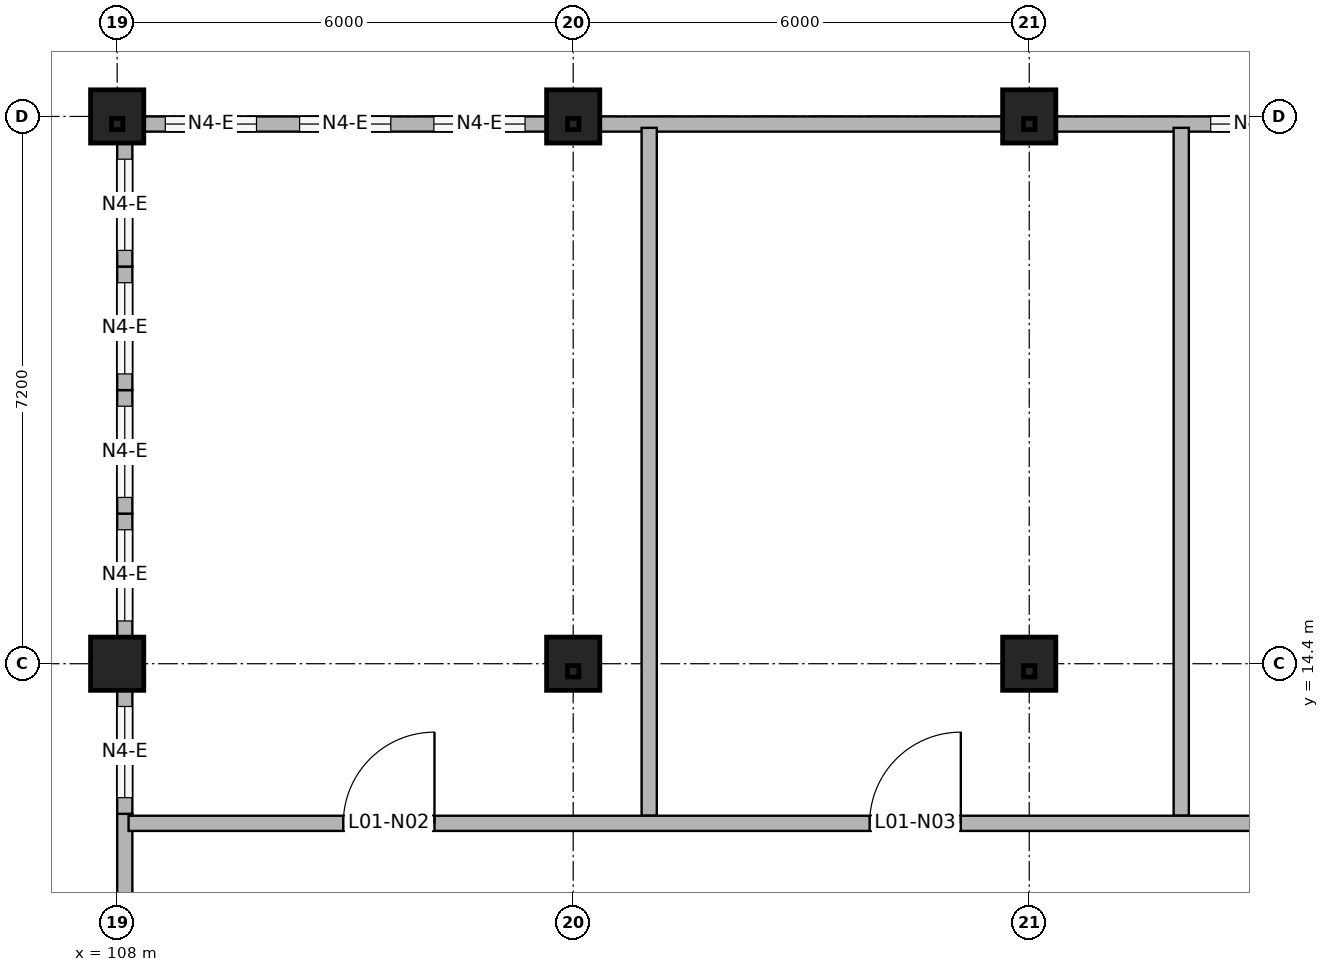
"""IFC4 building model, lengths in metres.
Left out: names, types, materials, properties, quantities, classifications, styles, units other than length and angle.
Written with IfcOpenShell. Run it as: python <this file> out.ifc"""

import sys

from ifc_helpers import new_model, si_unit, direction, frame, frame_2d, origin, origin_2d, place, context, subcontext, project, spatial, rectangle, hollow_rectangle, extrude, element, fill, save


model = new_model("IFC4")
c1 = context("Model", 3, precision=1e-05, world=origin(), true_north=direction((0.0, 1.0)))
c2 = subcontext(c1, "Body", "Model", "MODEL_VIEW")
j1 = project(units=[si_unit("LENGTHUNIT", "METRE"), si_unit("PLANEANGLEUNIT", "RADIAN")], contexts=[c1])
p1 = place(None, origin())
s1 = spatial("IfcSite", under=j1, at=p1, CompositionType="ELEMENT")
p2 = place(p1, origin())
s2 = spatial("IfcBuilding", under=s1, at=p2, CompositionType="ELEMENT")
p3 = place(p2, frame((0.0, 0.0, 4.2)))
s3 = spatial("IfcBuildingStorey", under=s2, at=p3, CompositionType="ELEMENT", Elevation=4.2)
for number, where, z_axis, x_axis in (
    (1, (108.0, 14.4, 0.0), (0.0, 0.0, 1.0), (1.0, 0.0, 0.0)),
    (2, (114.0, 14.4, 0.0), (0.0, 0.0, 1.0), (1.0, 0.0, 0.0)),
    (3, (120.0, 14.4, 0.0), (0.0, 0.0, 1.0), (1.0, 0.0, 0.0)),
    (4, (108.0, 21.6, 0.0), (0.0, 0.0, 1.0), (1.0, 0.0, 0.0)),
    (5, (114.0, 21.6, 0.0), (0.0, 0.0, 1.0), (1.0, 0.0, 0.0)),
    (6, (120.0, 21.6, 0.0), (0.0, 0.0, 1.0), (1.0, 0.0, 0.0)),
):
    element("IfcColumn", number, at=place(p3, frame(where, z_axis=z_axis, x_axis=x_axis)), inside=s3, PredefinedType="COLUMN", context=c2, shape_type="SweptSolid", body=[
        extrude(rectangle(XDim=0.7, YDim=0.7, at=origin_2d()), origin(), (0.0, 0.0, 1.0), 4.004),
    ])
for number, where, z_axis, x_axis in (
    (7, (108.0, 14.3, 4.004), (0.0, 0.0, 1.0), (1.0, 0.0, 0.0)),
    (8, (114.0, 14.3, 4.004), (0.0, 0.0, 1.0), (1.0, 0.0, 0.0)),
    (9, (120.0, 14.3, 4.004), (0.0, 0.0, 1.0), (1.0, 0.0, 0.0)),
    (10, (108.0, 21.5, 4.004), (0.0, 0.0, 1.0), (1.0, 0.0, 0.0)),
    (11, (114.0, 21.5, 4.004), (0.0, 0.0, 1.0), (1.0, 0.0, 0.0)),
    (12, (120.0, 21.5, 4.004), (0.0, 0.0, 1.0), (1.0, 0.0, 0.0)),
):
    element("IfcColumn", number, at=place(p3, frame(where, z_axis=z_axis, x_axis=x_axis)), inside=s3, PredefinedType="COLUMN", context=c2, shape_type="SweptSolid", body=[
        extrude(hollow_rectangle(XDim=0.15, YDim=0.15, WallThickness=0.008, at=origin_2d()), origin(), (0.0, 0.0, 1.0), 1.155),
    ])
p4 = place(p3, frame((108.35, 21.5, 0.0), z_axis=(0.0, 0.0, 1.0), x_axis=(1.0, 0.0, 0.0)))
e13 = element("IfcWall", 13, at=p4, inside=s3, PredefinedType="SOLIDWALL", context=c2, shape_type="SweptSolid", body=[
    extrude(rectangle(XDim=5.3, YDim=0.2, at=frame_2d((2.65, 0.0))), origin(), (0.0, 0.0, 1.0), 3.204),
])
p5 = place(p4, frame((0.283, 0.0, 1.2)))
e14 = element("IfcOpeningElement", 14, at=p5, cuts=e13, PredefinedType="OPENING", context=c2, shape_type="SweptSolid", body=[
    extrude(rectangle(XDim=1.2, YDim=1.4, at=frame_2d((0.6, 0.7))), frame((0.0, 0.11, 0.0), z_axis=(0.0, -1.0, 0.0), x_axis=(1.0, 0.0, 0.0)), (0.0, 0.0, 1.0), 0.22),
])
p6 = place(p4, frame((2.05, 0.0, 1.2)))
e15 = element("IfcOpeningElement", 15, at=p6, cuts=e13, PredefinedType="OPENING", context=c2, shape_type="SweptSolid", body=[
    extrude(rectangle(XDim=1.2, YDim=1.4, at=frame_2d((0.6, 0.7))), frame((0.0, 0.11, 0.0), z_axis=(0.0, -1.0, 0.0), x_axis=(1.0, 0.0, 0.0)), (0.0, 0.0, 1.0), 0.22),
])
p7 = place(p4, frame((3.817, 0.0, 1.2)))
e16 = element("IfcOpeningElement", 16, at=p7, cuts=e13, PredefinedType="OPENING", context=c2, shape_type="SweptSolid", body=[
    extrude(rectangle(XDim=1.2, YDim=1.4, at=frame_2d((0.6, 0.7))), frame((0.0, 0.11, 0.0), z_axis=(0.0, -1.0, 0.0), x_axis=(1.0, 0.0, 0.0)), (0.0, 0.0, 1.0), 0.22),
])
p8 = place(p3, frame((114.35, 21.5, 0.0), z_axis=(0.0, 0.0, 1.0), x_axis=(1.0, 0.0, 0.0)))
e17 = element("IfcWall", 17, at=p8, inside=s3, PredefinedType="SOLIDWALL", context=c2, shape_type="SweptSolid", body=[
    extrude(rectangle(XDim=5.3, YDim=0.2, at=frame_2d((2.65, 0.0))), origin(), (0.0, 0.0, 1.0), 3.204),
])
p9 = place(p3, frame((120.35, 21.5, 0.0), z_axis=(0.0, 0.0, 1.0), x_axis=(1.0, 0.0, 0.0)))
e18 = element("IfcWall", 18, at=p9, inside=s3, PredefinedType="SOLIDWALL", context=c2, shape_type="SweptSolid", body=[
    extrude(rectangle(XDim=5.3, YDim=0.2, at=frame_2d((2.65, 0.0))), origin(), (0.0, 0.0, 1.0), 3.204),
])
p10 = place(p9, frame((2.038, 0.0, 1.2)))
e19 = element("IfcOpeningElement", 19, at=p10, cuts=e18, PredefinedType="OPENING", context=c2, shape_type="SweptSolid", body=[
    extrude(rectangle(XDim=1.2, YDim=1.4, at=frame_2d((0.6, 0.7))), frame((0.0, 0.11, 0.0), z_axis=(0.0, -1.0, 0.0), x_axis=(1.0, 0.0, 0.0)), (0.0, 0.0, 1.0), 0.22),
])
p11 = place(p9, frame((3.812, 0.0, 1.2)))
e20 = element("IfcOpeningElement", 20, at=p11, cuts=e18, PredefinedType="OPENING", context=c2, shape_type="SweptSolid", body=[
    extrude(rectangle(XDim=1.2, YDim=1.4, at=frame_2d((0.6, 0.7))), frame((0.0, 0.11, 0.0), z_axis=(0.0, -1.0, 0.0), x_axis=(1.0, 0.0, 0.0)), (0.0, 0.0, 1.0), 0.22),
])
p12 = place(p3, frame((108.1, 10.8, 0.0), z_axis=(0.0, 0.0, 1.0), x_axis=(0.0, 1.0, 0.0)))
e21 = element("IfcWall", 21, at=p12, inside=s3, PredefinedType="SOLIDWALL", context=c2, shape_type="SweptSolid", body=[
    extrude(rectangle(XDim=1.625, YDim=0.2, at=frame_2d((0.812, 0.0))), origin(), (0.0, 0.0, 1.0), 4.691),
])
p13 = place(p3, frame((108.1, 12.425, 0.0), z_axis=(0.0, 0.0, 1.0), x_axis=(0.0, 1.0, 0.0)))
e22 = element("IfcWall", 22, at=p13, inside=s3, PredefinedType="SOLIDWALL", context=c2, shape_type="SweptSolid", body=[
    extrude(rectangle(XDim=1.625, YDim=0.2, at=frame_2d((0.812, 0.0))), origin(), (0.0, 0.0, 1.0), 5.007),
])
p14 = place(p13, frame((0.212, 0.0, 1.2)))
e23 = element("IfcOpeningElement", 23, at=p14, cuts=e22, PredefinedType="OPENING", context=c2, shape_type="SweptSolid", body=[
    extrude(rectangle(XDim=1.2, YDim=1.4, at=frame_2d((0.6, 0.7))), frame((0.0, 0.11, 0.0), z_axis=(0.0, -1.0, 0.0), x_axis=(1.0, 0.0, 0.0)), (0.0, 0.0, 1.0), 0.22),
])
p15 = place(p3, frame((108.1, 14.75, 0.0), z_axis=(0.0, 0.0, 1.0), x_axis=(0.0, 1.0, 0.0)))
e24 = element("IfcWall", 24, at=p15, inside=s3, PredefinedType="SOLIDWALL", context=c2, shape_type="SweptSolid", body=[
    extrude(rectangle(XDim=1.625, YDim=0.2, at=frame_2d((0.812, 0.0))), origin(), (0.0, 0.0, 1.0), 4.059),
])
p16 = place(p15, frame((0.212, 0.0, 1.2)))
e25 = element("IfcOpeningElement", 25, at=p16, cuts=e24, PredefinedType="OPENING", context=c2, shape_type="SweptSolid", body=[
    extrude(rectangle(XDim=1.2, YDim=1.4, at=frame_2d((0.6, 0.7))), frame((0.0, 0.11, 0.0), z_axis=(0.0, -1.0, 0.0), x_axis=(1.0, 0.0, 0.0)), (0.0, 0.0, 1.0), 0.22),
])
p17 = place(p3, frame((108.1, 16.375, 0.0), z_axis=(0.0, 0.0, 1.0), x_axis=(0.0, 1.0, 0.0)))
e26 = element("IfcWall", 26, at=p17, inside=s3, PredefinedType="SOLIDWALL", context=c2, shape_type="SweptSolid", body=[
    extrude(rectangle(XDim=1.625, YDim=0.2, at=frame_2d((0.812, 0.0))), origin(), (0.0, 0.0, 1.0), 4.375),
])
p18 = place(p17, frame((0.212, 0.0, 1.2)))
e27 = element("IfcOpeningElement", 27, at=p18, cuts=e26, PredefinedType="OPENING", context=c2, shape_type="SweptSolid", body=[
    extrude(rectangle(XDim=1.2, YDim=1.4, at=frame_2d((0.6, 0.7))), frame((0.0, 0.11, 0.0), z_axis=(0.0, -1.0, 0.0), x_axis=(1.0, 0.0, 0.0)), (0.0, 0.0, 1.0), 0.22),
])
p19 = place(p3, frame((108.1, 18.0, 0.0), z_axis=(0.0, 0.0, 1.0), x_axis=(0.0, 1.0, 0.0)))
e28 = element("IfcWall", 28, at=p19, inside=s3, PredefinedType="SOLIDWALL", context=c2, shape_type="SweptSolid", body=[
    extrude(rectangle(XDim=1.625, YDim=0.2, at=frame_2d((0.812, 0.0))), origin(), (0.0, 0.0, 1.0), 4.691),
])
p20 = place(p19, frame((0.212, 0.0, 1.2)))
e29 = element("IfcOpeningElement", 29, at=p20, cuts=e28, PredefinedType="OPENING", context=c2, shape_type="SweptSolid", body=[
    extrude(rectangle(XDim=1.2, YDim=1.4, at=frame_2d((0.6, 0.7))), frame((0.0, 0.11, 0.0), z_axis=(0.0, -1.0, 0.0), x_axis=(1.0, 0.0, 0.0)), (0.0, 0.0, 1.0), 0.22),
])
p21 = place(p3, frame((108.1, 19.625, 0.0), z_axis=(0.0, 0.0, 1.0), x_axis=(0.0, 1.0, 0.0)))
e30 = element("IfcWall", 30, at=p21, inside=s3, PredefinedType="SOLIDWALL", context=c2, shape_type="SweptSolid", body=[
    extrude(rectangle(XDim=1.625, YDim=0.2, at=frame_2d((0.812, 0.0))), origin(), (0.0, 0.0, 1.0), 5.007),
])
p22 = place(p21, frame((0.212, 0.0, 1.2)))
e31 = element("IfcOpeningElement", 31, at=p22, cuts=e30, PredefinedType="OPENING", context=c2, shape_type="SweptSolid", body=[
    extrude(rectangle(XDim=1.2, YDim=1.4, at=frame_2d((0.6, 0.7))), frame((0.0, 0.11, 0.0), z_axis=(0.0, -1.0, 0.0), x_axis=(1.0, 0.0, 0.0)), (0.0, 0.0, 1.0), 0.22),
])
for number, where, z_axis, x_axis in (
    (32, (115.0, 12.4, 0.0), (0.0, 0.0, 1.0), (0.0, 1.0, 0.0)),
    (33, (122.0, 12.4, 0.0), (0.0, 0.0, 1.0), (0.0, 1.0, 0.0)),
):
    element("IfcWall", number, at=place(p3, frame(where, z_axis=z_axis, x_axis=x_axis)), inside=s3, PredefinedType="PARTITIONING", context=c2, shape_type="SweptSolid", body=[
        extrude(rectangle(XDim=9.05, YDim=0.2, at=frame_2d((4.525, 0.0))), origin(), (0.0, 0.0, 1.0), 3.204),
    ])
p23 = place(p3, frame((108.15, 12.3, 0.0), z_axis=(0.0, 0.0, 1.0), x_axis=(1.0, 0.0, 0.0)))
e34 = element("IfcWall", 34, at=p23, inside=s3, PredefinedType="PARTITIONING", context=c2, shape_type="SweptSolid", body=[
    extrude(rectangle(XDim=17.7, YDim=0.2, at=frame_2d((8.85, 0.0))), origin(), (0.0, 0.0, 1.0), 3.95),
])
p24 = place(p23, frame((2.825, 0.0, 0.0)))
e35 = element("IfcOpeningElement", 35, at=p24, cuts=e34, PredefinedType="OPENING", context=c2, shape_type="SweptSolid", body=[
    extrude(rectangle(XDim=1.2, YDim=2.1, at=frame_2d((0.6, 1.05))), frame((0.0, 0.11, 0.0), z_axis=(0.0, -1.0, 0.0), x_axis=(1.0, 0.0, 0.0)), (0.0, 0.0, 1.0), 0.22),
])
p25 = place(p23, frame((9.75, 0.0, 0.0)))
e36 = element("IfcOpeningElement", 36, at=p25, cuts=e34, PredefinedType="OPENING", context=c2, shape_type="SweptSolid", body=[
    extrude(rectangle(XDim=1.2, YDim=2.1, at=frame_2d((0.6, 1.05))), frame((0.0, 0.11, 0.0), z_axis=(0.0, -1.0, 0.0), x_axis=(1.0, 0.0, 0.0)), (0.0, 0.0, 1.0), 0.22),
])
p26 = place(p23, frame((15.275, 0.0, 0.0)))
e37 = element("IfcOpeningElement", 37, at=p26, cuts=e34, PredefinedType="OPENING", context=c2, shape_type="SweptSolid", body=[
    extrude(rectangle(XDim=1.0, YDim=2.1, at=frame_2d((0.5, 1.05))), frame((0.0, 0.11, 0.0), z_axis=(0.0, -1.0, 0.0), x_axis=(1.0, 0.0, 0.0)), (0.0, 0.0, 1.0), 0.22),
])
p27 = place(p5, origin())
e38 = element("IfcWindow", 38, at=p27, inside=s3, PartitioningType="SINGLE_PANEL", PredefinedType="WINDOW", context=c2, shape_type="SweptSolid", body=[
    extrude(rectangle(XDim=1.2, YDim=1.4, at=frame_2d((0.6, 0.7))), frame((0.0, 0.03, 0.0), z_axis=(0.0, -1.0, 0.0), x_axis=(1.0, 0.0, 0.0)), (0.0, 0.0, 1.0), 0.06),
])
fill(e14, e38)
p28 = place(p6, origin())
e39 = element("IfcWindow", 39, at=p28, inside=s3, PartitioningType="SINGLE_PANEL", PredefinedType="WINDOW", context=c2, shape_type="SweptSolid", body=[
    extrude(rectangle(XDim=1.2, YDim=1.4, at=frame_2d((0.6, 0.7))), frame((0.0, 0.03, 0.0), z_axis=(0.0, -1.0, 0.0), x_axis=(1.0, 0.0, 0.0)), (0.0, 0.0, 1.0), 0.06),
])
fill(e15, e39)
p29 = place(p7, origin())
e40 = element("IfcWindow", 40, at=p29, inside=s3, PartitioningType="SINGLE_PANEL", PredefinedType="WINDOW", context=c2, shape_type="SweptSolid", body=[
    extrude(rectangle(XDim=1.2, YDim=1.4, at=frame_2d((0.6, 0.7))), frame((0.0, 0.03, 0.0), z_axis=(0.0, -1.0, 0.0), x_axis=(1.0, 0.0, 0.0)), (0.0, 0.0, 1.0), 0.06),
])
fill(e16, e40)
p30 = place(p10, origin())
e41 = element("IfcWindow", 41, at=p30, inside=s3, PartitioningType="SINGLE_PANEL", PredefinedType="WINDOW", context=c2, shape_type="SweptSolid", body=[
    extrude(rectangle(XDim=1.2, YDim=1.4, at=frame_2d((0.6, 0.7))), frame((0.0, 0.03, 0.0), z_axis=(0.0, -1.0, 0.0), x_axis=(1.0, 0.0, 0.0)), (0.0, 0.0, 1.0), 0.06),
])
fill(e19, e41)
p31 = place(p14, origin())
e42 = element("IfcWindow", 42, at=p31, inside=s3, PartitioningType="SINGLE_PANEL", PredefinedType="WINDOW", context=c2, shape_type="SweptSolid", body=[
    extrude(rectangle(XDim=1.2, YDim=1.4, at=frame_2d((0.6, 0.7))), frame((0.0, 0.03, 0.0), z_axis=(0.0, -1.0, 0.0), x_axis=(1.0, 0.0, 0.0)), (0.0, 0.0, 1.0), 0.06),
])
fill(e23, e42)
p32 = place(p16, origin())
e43 = element("IfcWindow", 43, at=p32, inside=s3, PartitioningType="SINGLE_PANEL", PredefinedType="WINDOW", context=c2, shape_type="SweptSolid", body=[
    extrude(rectangle(XDim=1.2, YDim=1.4, at=frame_2d((0.6, 0.7))), frame((0.0, 0.03, 0.0), z_axis=(0.0, -1.0, 0.0), x_axis=(1.0, 0.0, 0.0)), (0.0, 0.0, 1.0), 0.06),
])
fill(e25, e43)
p33 = place(p18, origin())
e44 = element("IfcWindow", 44, at=p33, inside=s3, PartitioningType="SINGLE_PANEL", PredefinedType="WINDOW", context=c2, shape_type="SweptSolid", body=[
    extrude(rectangle(XDim=1.2, YDim=1.4, at=frame_2d((0.6, 0.7))), frame((0.0, 0.03, 0.0), z_axis=(0.0, -1.0, 0.0), x_axis=(1.0, 0.0, 0.0)), (0.0, 0.0, 1.0), 0.06),
])
fill(e27, e44)
p34 = place(p20, origin())
e45 = element("IfcWindow", 45, at=p34, inside=s3, PartitioningType="SINGLE_PANEL", PredefinedType="WINDOW", context=c2, shape_type="SweptSolid", body=[
    extrude(rectangle(XDim=1.2, YDim=1.4, at=frame_2d((0.6, 0.7))), frame((0.0, 0.03, 0.0), z_axis=(0.0, -1.0, 0.0), x_axis=(1.0, 0.0, 0.0)), (0.0, 0.0, 1.0), 0.06),
])
fill(e29, e45)
p35 = place(p22, origin())
e46 = element("IfcWindow", 46, at=p35, inside=s3, PartitioningType="SINGLE_PANEL", PredefinedType="WINDOW", context=c2, shape_type="SweptSolid", body=[
    extrude(rectangle(XDim=1.2, YDim=1.4, at=frame_2d((0.6, 0.7))), frame((0.0, 0.03, 0.0), z_axis=(0.0, -1.0, 0.0), x_axis=(1.0, 0.0, 0.0)), (0.0, 0.0, 1.0), 0.06),
])
fill(e31, e46)
p36 = place(p24, origin())
e47 = element("IfcDoor", 47, at=p36, inside=s3, OperationType="SINGLE_SWING_RIGHT", PredefinedType="DOOR", context=c2, shape_type="SweptSolid", body=[
    extrude(rectangle(XDim=1.2, YDim=2.1, at=frame_2d((0.6, 1.05))), frame((0.0, 0.025, 0.0), z_axis=(0.0, -1.0, 0.0), x_axis=(1.0, 0.0, 0.0)), (0.0, 0.0, 1.0), 0.05),
])
fill(e35, e47)
p37 = place(p25, origin())
e48 = element("IfcDoor", 48, at=p37, inside=s3, OperationType="SINGLE_SWING_RIGHT", PredefinedType="DOOR", context=c2, shape_type="SweptSolid", body=[
    extrude(rectangle(XDim=1.2, YDim=2.1, at=frame_2d((0.6, 1.05))), frame((0.0, 0.025, 0.0), z_axis=(0.0, -1.0, 0.0), x_axis=(1.0, 0.0, 0.0)), (0.0, 0.0, 1.0), 0.05),
])
fill(e36, e48)
save(model, sys.argv[1])
